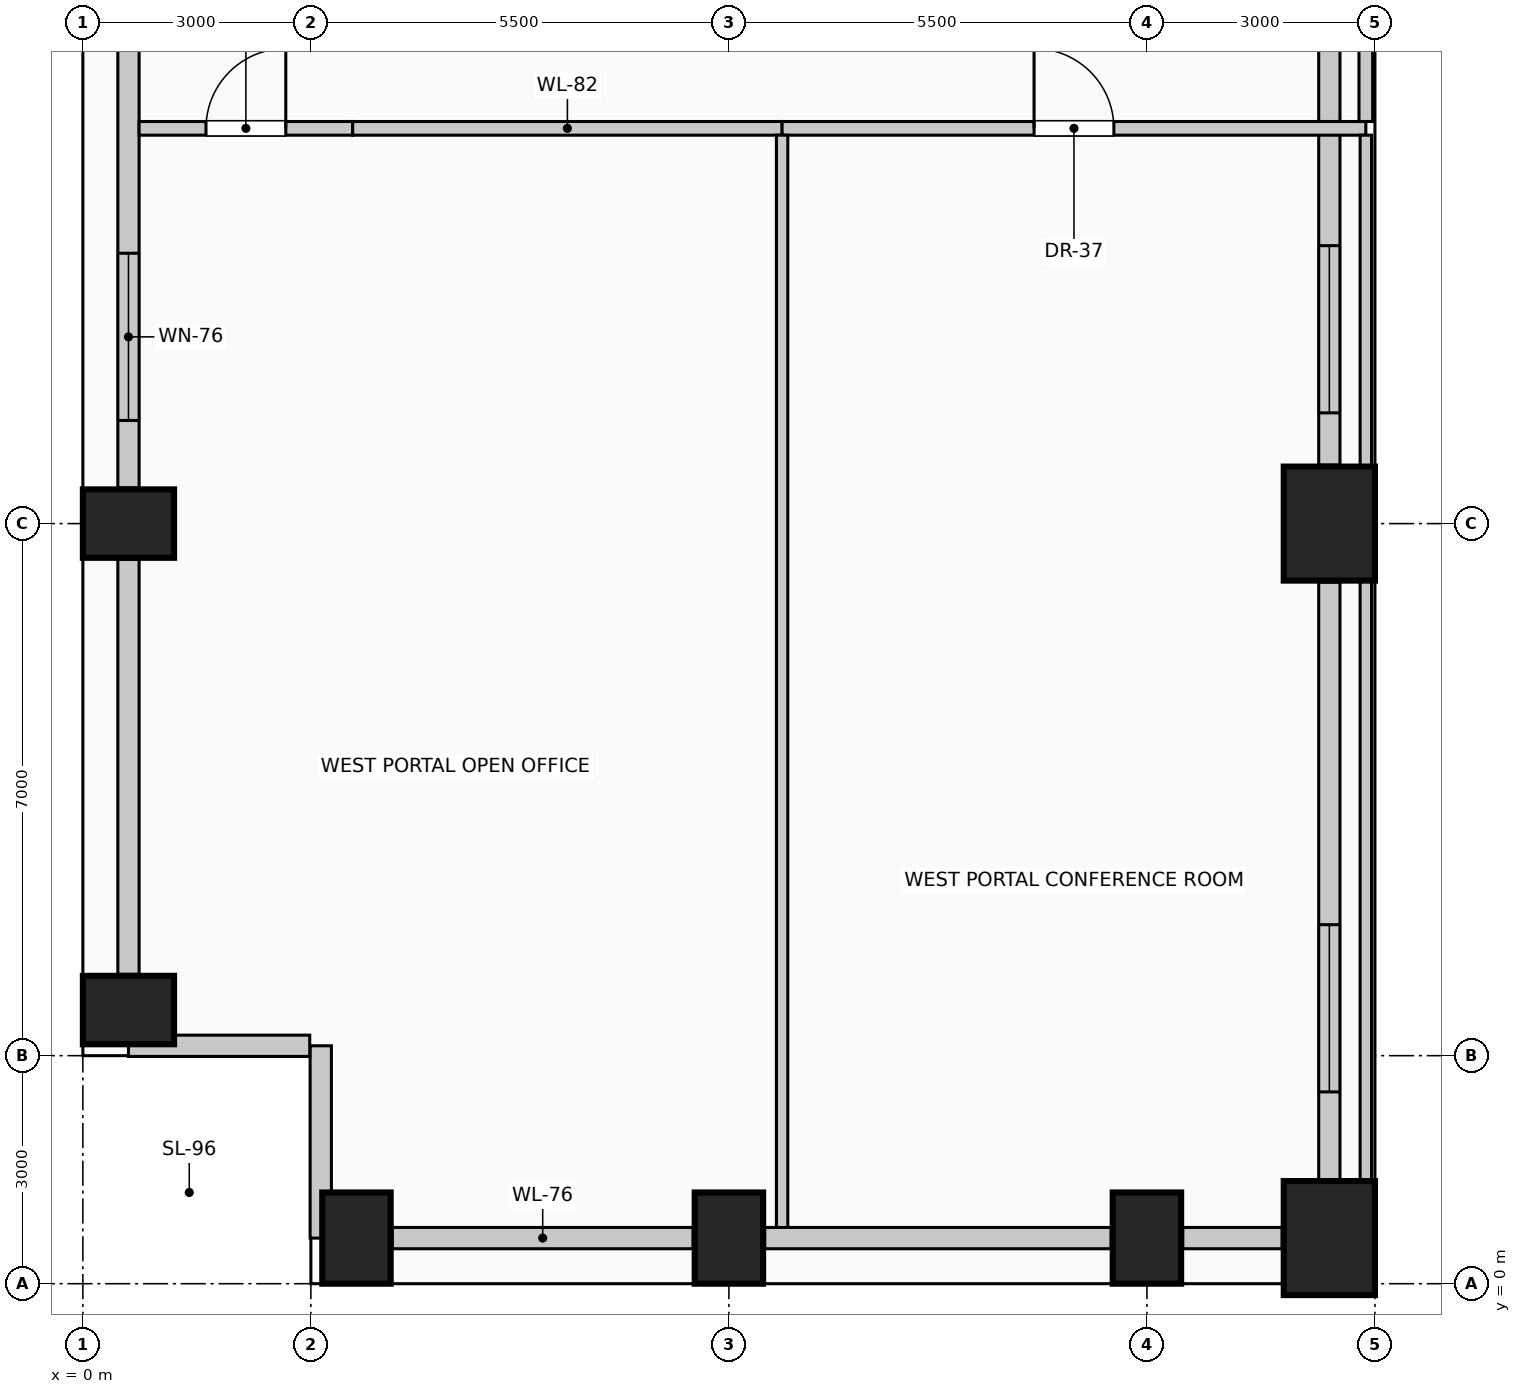
"""IFC4 building model, lengths in metres.
Left out: names, types, materials, properties, quantities, classifications, styles, units other than length and angle.
Written with IfcOpenShell. Run it as: python <this file> out.ifc"""

import sys

from ifc_helpers import new_model, si_unit, direction, frame, frame_2d, origin, origin_2d, place, context, subcontext, project, spatial, rectangle, extrude, element, fill, save


model = new_model("IFC4")
c1 = context("Model", 3, precision=1e-05, world=origin(), true_north=direction((0.0, 1.0)))
c2 = subcontext(c1, "Body", "Model", "MODEL_VIEW")
j1 = project(units=[si_unit("LENGTHUNIT", "METRE"), si_unit("PLANEANGLEUNIT", "RADIAN")], contexts=[c1])
p1 = place(None, origin())
s1 = spatial("IfcSite", under=j1, at=p1, CompositionType="ELEMENT")
p2 = place(p1, origin())
s2 = spatial("IfcBuilding", under=s1, at=p2, CompositionType="ELEMENT")
p3 = place(p2, frame((0.0, 0.0, 26.6)))
s3 = spatial("IfcBuildingStorey", under=s2, at=p3, CompositionType="ELEMENT", Elevation=26.6)
for number, where, z_axis, x_axis in (
    (1, (3.6, 0.6, 0.0), (0.0, 0.0, 1.0), (1.0, 0.0, 0.0)),
    (2, (8.5, 0.6, 0.0), (0.0, 0.0, 1.0), (1.0, 0.0, 0.0)),
    (3, (14.0, 0.6, 0.0), (0.0, 0.0, 1.0), (1.0, 0.0, 0.0)),
):
    element("IfcColumn", number, at=place(p3, frame(where, z_axis=z_axis, x_axis=x_axis)), inside=s3, PredefinedType="COLUMN", context=c2, shape_type="SweptSolid", body=[
        extrude(rectangle(XDim=0.9, YDim=1.2, at=origin_2d()), origin(), (0.0, 0.0, 1.0), 4.0),
    ])
p4 = place(p3, frame((16.4, 0.6, 0.0), z_axis=(0.0, 0.0, 1.0), x_axis=(1.0, 0.0, 0.0)))
e4 = element("IfcColumn", 4, at=p4, inside=s3, PredefinedType="COLUMN", context=c2, shape_type="SweptSolid", body=[
    extrude(rectangle(XDim=1.2, YDim=1.5, at=origin_2d()), origin(), (0.0, 0.0, 1.0), 4.0),
])
for number, where, z_axis, x_axis in (
    (5, (0.6, 3.6, 0.0), (0.0, 0.0, 1.0), (0.0, 1.0, 0.0)),
    (6, (0.6, 10.0, 0.0), (0.0, 0.0, 1.0), (0.0, 1.0, 0.0)),
):
    element("IfcColumn", number, at=place(p3, frame(where, z_axis=z_axis, x_axis=x_axis)), inside=s3, PredefinedType="COLUMN", context=c2, shape_type="SweptSolid", body=[
        extrude(rectangle(XDim=0.9, YDim=1.2, at=origin_2d()), origin(), (0.0, 0.0, 1.0), 4.0),
    ])
p5 = place(p3, frame((16.4, 10.0, 0.0), z_axis=(0.0, 0.0, 1.0), x_axis=(1.0, 0.0, 0.0)))
e7 = element("IfcColumn", 7, at=p5, inside=s3, PredefinedType="COLUMN", context=c2, shape_type="SweptSolid", body=[
    extrude(rectangle(XDim=1.2, YDim=1.5, at=origin_2d()), origin(), (0.0, 0.0, 1.0), 4.0),
])
p6 = place(p3, frame((8.03, 0.6, 0.0), z_axis=(0.0, 0.0, 1.0), x_axis=(-1.0, 0.0, 0.0)))
e8 = element("IfcWall", 8, at=p6, inside=s3, PredefinedType="SOLIDWALL", context=c2, shape_type="SweptSolid", body=[
    extrude(rectangle(XDim=3.96, YDim=0.28, at=frame_2d((1.98, 0.0))), origin(), (0.0, 0.0, 1.0), 2.85),
])
p7 = place(p3, frame((13.53, 0.6, 0.0), z_axis=(0.0, 0.0, 1.0), x_axis=(-1.0, 0.0, 0.0)))
e9 = element("IfcWall", 9, at=p7, inside=s3, PredefinedType="SOLIDWALL", context=c2, shape_type="SweptSolid", body=[
    extrude(rectangle(XDim=4.56, YDim=0.28, at=frame_2d((2.28, 0.0))), origin(), (0.0, 0.0, 1.0), 2.85),
])
p8 = place(p3, frame((15.78, 0.6, 0.0), z_axis=(0.0, 0.0, 1.0), x_axis=(-1.0, 0.0, 0.0)))
e10 = element("IfcWall", 10, at=p8, inside=s3, PredefinedType="SOLIDWALL", context=c2, shape_type="SweptSolid", body=[
    extrude(rectangle(XDim=1.31, YDim=0.28, at=frame_2d((0.655, 0.0))), origin(), (0.0, 0.0, 1.0), 2.85),
])
p9 = place(p3, frame((0.6, 4.07, 0.0), z_axis=(0.0, 0.0, 1.0), x_axis=(0.0, 1.0, 0.0)))
e11 = element("IfcWall", 11, at=p9, inside=s3, PredefinedType="SOLIDWALL", context=c2, shape_type="SweptSolid", body=[
    extrude(rectangle(XDim=5.46, YDim=0.28, at=frame_2d((2.73, 0.0))), origin(), (0.0, 0.0, 1.0), 2.85),
])
p10 = place(p3, frame((0.6, 10.47, 0.0), z_axis=(0.0, 0.0, 1.0), x_axis=(0.0, 1.0, 0.0)))
e12 = element("IfcWall", 12, at=p10, inside=s3, PredefinedType="SOLIDWALL", context=c2, shape_type="SweptSolid", body=[
    extrude(rectangle(XDim=7.06, YDim=0.28, at=frame_2d((3.53, 0.0))), origin(), (0.0, 0.0, 1.0), 2.85),
])
p11 = place(p10, frame((0.887, 0.0, 0.42)))
e13 = element("IfcOpeningElement", 13, at=p11, cuts=e12, PredefinedType="OPENING", context=c2, shape_type="SweptSolid", body=[
    extrude(rectangle(XDim=2.2, YDim=1.95, at=frame_2d((1.1, 0.975))), frame((0.0, 0.15, 0.0), z_axis=(0.0, -1.0, 0.0), x_axis=(1.0, 0.0, 0.0)), (0.0, 0.0, 1.0), 0.3),
])
p12 = place(p3, frame((3.13, 0.6, 0.0), z_axis=(0.0, 0.0, 1.0), x_axis=(0.0, 1.0, 0.0)))
e14 = element("IfcWall", 14, at=p12, inside=s3, PredefinedType="SOLIDWALL", context=c2, shape_type="SweptSolid", body=[
    extrude(rectangle(XDim=2.53, YDim=0.28, at=frame_2d((1.265, 0.0))), origin(), (0.0, 0.0, 1.0), 3.7),
])
p13 = place(p3, frame((2.985, 3.13, 0.0), z_axis=(0.0, 0.0, 1.0), x_axis=(-1.0, 0.0, 0.0)))
e15 = element("IfcWall", 15, at=p13, inside=s3, PredefinedType="SOLIDWALL", context=c2, shape_type="SweptSolid", body=[
    extrude(rectangle(XDim=2.385, YDim=0.28, at=frame_2d((1.192, 0.0))), origin(), (0.0, 0.0, 1.0), 3.7),
])
p14 = place(p3, frame((16.4, 9.23, 0.0), z_axis=(0.0, 0.0, 1.0), x_axis=(0.0, -1.0, 0.0)))
e16 = element("IfcWall", 16, at=p14, inside=s3, PredefinedType="SOLIDWALL", context=c2, shape_type="SweptSolid", body=[
    extrude(rectangle(XDim=7.86, YDim=0.28, at=frame_2d((3.93, 0.0))), origin(), (0.0, 0.0, 1.0), 3.0),
])
p15 = place(p14, frame((4.507, 0.0, 0.42)))
e17 = element("IfcOpeningElement", 17, at=p15, cuts=e16, PredefinedType="OPENING", context=c2, shape_type="SweptSolid", body=[
    extrude(rectangle(XDim=2.2, YDim=1.95, at=frame_2d((1.1, 0.975))), frame((0.0, 0.15, 0.0), z_axis=(0.0, -1.0, 0.0), x_axis=(1.0, 0.0, 0.0)), (0.0, 0.0, 1.0), 0.3),
])
p16 = place(p3, frame((16.4, 17.23, 0.0), z_axis=(0.0, 0.0, 1.0), x_axis=(0.0, -1.0, 0.0)))
e18 = element("IfcWall", 18, at=p16, inside=s3, PredefinedType="SOLIDWALL", context=c2, shape_type="SweptSolid", body=[
    extrude(rectangle(XDim=6.46, YDim=0.28, at=frame_2d((3.23, 0.0))), origin(), (0.0, 0.0, 1.0), 3.0),
])
p17 = place(p16, frame((3.573, 0.0, 0.42)))
e19 = element("IfcOpeningElement", 19, at=p17, cuts=e18, PredefinedType="OPENING", context=c2, shape_type="SweptSolid", body=[
    extrude(rectangle(XDim=2.2, YDim=1.95, at=frame_2d((1.1, 0.975))), frame((0.0, 0.15, 0.0), z_axis=(0.0, -1.0, 0.0), x_axis=(1.0, 0.0, 0.0)), (0.0, 0.0, 1.0), 0.3),
])
p18 = place(p3, frame((0.74, 15.2, 0.0), z_axis=(0.0, 0.0, 1.0), x_axis=(1.0, 0.0, 0.0)))
e20 = element("IfcWall", 20, at=p18, inside=s3, PredefinedType="PARTITIONING", context=c2, shape_type="SweptSolid", body=[
    extrude(rectangle(XDim=2.81, YDim=0.18, at=frame_2d((1.405, 0.0))), origin(), (0.0, 0.0, 1.0), 3.7),
])
p19 = place(p18, frame((0.88, 0.0, 0.0)))
e21 = element("IfcOpeningElement", 21, at=p19, cuts=e20, PredefinedType="OPENING", context=c2, shape_type="SweptSolid", body=[
    extrude(rectangle(XDim=1.05, YDim=2.15, at=frame_2d((0.525, 1.075))), frame((0.0, 0.1, 0.0), z_axis=(0.0, -1.0, 0.0), x_axis=(1.0, 0.0, 0.0)), (0.0, 0.0, 1.0), 0.2),
])
p20 = place(p3, frame((3.55, 15.2, 0.0), z_axis=(0.0, 0.0, 1.0), x_axis=(1.0, 0.0, 0.0)))
e22 = element("IfcWall", 22, at=p20, inside=s3, PredefinedType="PARTITIONING", context=c2, shape_type="SweptSolid", body=[
    extrude(rectangle(XDim=5.65, YDim=0.18, at=frame_2d((2.825, 0.0))), origin(), (0.0, 0.0, 1.0), 3.7),
])
p21 = place(p3, frame((9.2, 15.2, 0.0), z_axis=(0.0, 0.0, 1.0), x_axis=(1.0, 0.0, 0.0)))
e23 = element("IfcWall", 23, at=p21, inside=s3, PredefinedType="PARTITIONING", context=c2, shape_type="SweptSolid", body=[
    extrude(rectangle(XDim=7.68, YDim=0.18, at=frame_2d((3.84, 0.0))), origin(), (0.0, 0.0, 1.0), 3.7),
])
p22 = place(p21, frame((3.315, 0.0, 0.0)))
e24 = element("IfcOpeningElement", 24, at=p22, cuts=e23, PredefinedType="OPENING", context=c2, shape_type="SweptSolid", body=[
    extrude(rectangle(XDim=1.05, YDim=2.15, at=frame_2d((0.525, 1.075))), frame((0.0, 0.1, 0.0), z_axis=(0.0, -1.0, 0.0), x_axis=(1.0, 0.0, 0.0)), (0.0, 0.0, 1.0), 0.2),
])
p23 = place(p3, frame((9.2, 0.74, 0.0), z_axis=(0.0, 0.0, 1.0), x_axis=(0.0, 1.0, 0.0)))
e25 = element("IfcWall", 25, at=p23, inside=s3, PredefinedType="PARTITIONING", context=c2, shape_type="SweptSolid", body=[
    extrude(rectangle(XDim=14.37, YDim=0.15, at=frame_2d((7.185, 0.0))), origin(), (0.0, 0.0, 1.0), 3.7),
])
p24 = place(p3, frame((16.88, 1.35, 0.0), z_axis=(0.0, 0.0, 1.0), x_axis=(0.0, 1.0, 0.0)))
e26 = element("IfcWall", 26, at=p24, inside=s3, PredefinedType="PARTITIONING", context=c2, shape_type="SweptSolid", body=[
    extrude(rectangle(XDim=7.9, YDim=0.15, at=frame_2d((3.95, 0.0))), origin(), (0.0, 0.0, 1.0), 3.7),
])
p25 = place(p3, frame((16.88, 10.75, 0.0), z_axis=(0.0, 0.0, 1.0), x_axis=(0.0, 1.0, 0.0)))
e27 = element("IfcWall", 27, at=p25, inside=s3, PredefinedType="PARTITIONING", context=c2, shape_type="SweptSolid", body=[
    extrude(rectangle(XDim=4.36, YDim=0.15, at=frame_2d((2.18, 0.0))), origin(), (0.0, 0.0, 1.0), 3.7),
])
p26 = place(p3, frame((16.88, 15.29, 0.0), z_axis=(0.0, 0.0, 1.0), x_axis=(0.0, 1.0, 0.0)))
e28 = element("IfcWall", 28, at=p26, inside=s3, PredefinedType="PARTITIONING", context=c2, shape_type="SweptSolid", body=[
    extrude(rectangle(XDim=1.96, YDim=0.18, at=frame_2d((0.98, 0.0))), origin(), (0.0, 0.0, 1.0), 3.7),
])
p27 = place(p11, origin())
e29 = element("IfcWindow", 29, at=p27, inside=s3, PartitioningType="SINGLE_PANEL", PredefinedType="WINDOW", context=c2, shape_type="SweptSolid", body=[
    extrude(rectangle(XDim=2.2, YDim=1.95, at=frame_2d((1.1, 0.975))), frame((0.0, 0.03, 0.0), z_axis=(0.0, -1.0, 0.0), x_axis=(1.0, 0.0, 0.0)), (0.0, 0.0, 1.0), 0.06),
])
fill(e13, e29)
p28 = place(p15, origin())
e30 = element("IfcWindow", 30, at=p28, inside=s3, PartitioningType="SINGLE_PANEL", PredefinedType="WINDOW", context=c2, shape_type="SweptSolid", body=[
    extrude(rectangle(XDim=2.2, YDim=1.95, at=frame_2d((1.1, 0.975))), frame((0.0, 0.03, 0.0), z_axis=(0.0, -1.0, 0.0), x_axis=(1.0, 0.0, 0.0)), (0.0, 0.0, 1.0), 0.06),
])
fill(e17, e30)
p29 = place(p17, origin())
e31 = element("IfcWindow", 31, at=p29, inside=s3, PartitioningType="SINGLE_PANEL", PredefinedType="WINDOW", context=c2, shape_type="SweptSolid", body=[
    extrude(rectangle(XDim=2.2, YDim=1.95, at=frame_2d((1.1, 0.975))), frame((0.0, 0.03, 0.0), z_axis=(0.0, -1.0, 0.0), x_axis=(1.0, 0.0, 0.0)), (0.0, 0.0, 1.0), 0.06),
])
fill(e19, e31)
p30 = place(p19, origin())
e32 = element("IfcDoor", 32, at=p30, inside=s3, OperationType="SINGLE_SWING_RIGHT", PredefinedType="DOOR", context=c2, shape_type="SweptSolid", body=[
    extrude(rectangle(XDim=1.05, YDim=2.15, at=frame_2d((0.525, 1.075))), frame((0.0, 0.025, 0.0), z_axis=(0.0, -1.0, 0.0), x_axis=(1.0, 0.0, 0.0)), (0.0, 0.0, 1.0), 0.05),
])
fill(e21, e32)
p31 = place(p22, origin())
e33 = element("IfcDoor", 33, at=p31, inside=s3, OperationType="SINGLE_SWING_LEFT", PredefinedType="DOOR", context=c2, shape_type="SweptSolid", body=[
    extrude(rectangle(XDim=1.05, YDim=2.15, at=frame_2d((0.525, 1.075))), frame((0.0, 0.025, 0.0), z_axis=(0.0, -1.0, 0.0), x_axis=(1.0, 0.0, 0.0)), (0.0, 0.0, 1.0), 0.05),
])
fill(e24, e33)
save(model, sys.argv[1])
